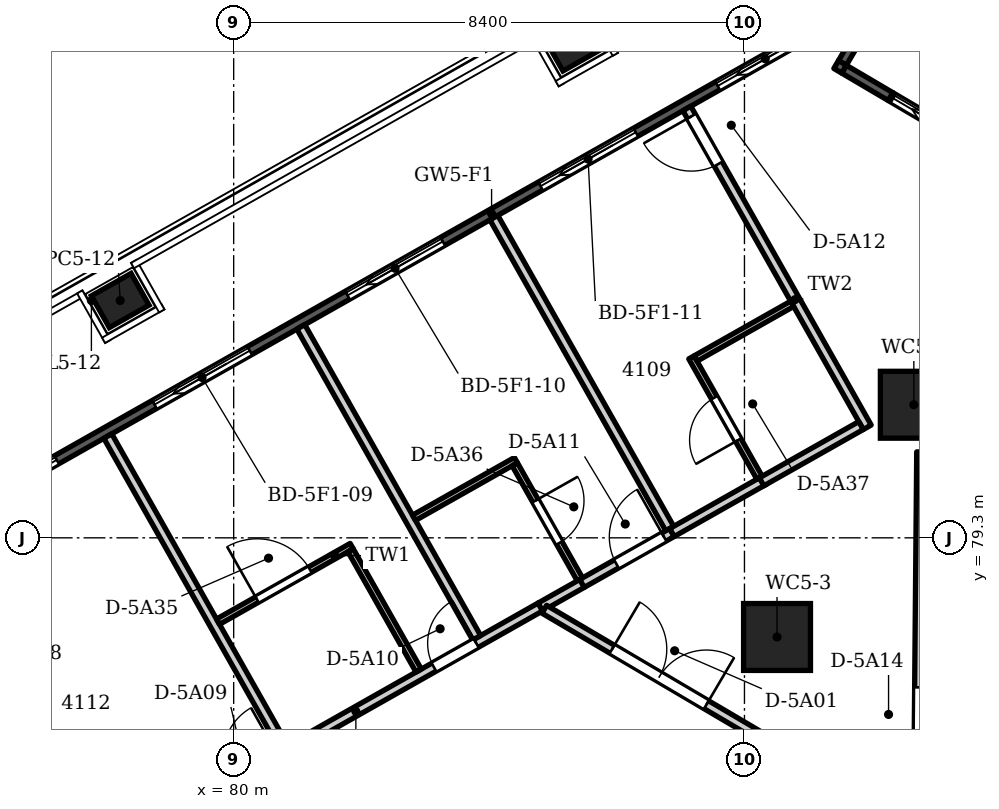
"""IFC4 building model, lengths in metres.
Left out: names, types, materials, properties, quantities, classifications, styles, units other than length and angle.
Written with IfcOpenShell. Run it as: python <this file> out.ifc"""

import sys

from ifc_helpers import new_model, si_unit, direction, frame, frame_2d, origin, origin_2d, place, context, subcontext, project, spatial, polyline, rectangle, circle, outline, extrude, element, fill, save


model = new_model("IFC4")
c1 = context("Model", 3, precision=1e-05, world=origin(), true_north=direction((0.0, 1.0)))
c2 = subcontext(c1, "Body", "Model", "MODEL_VIEW")
j1 = project(units=[si_unit("LENGTHUNIT", "METRE"), si_unit("PLANEANGLEUNIT", "RADIAN")], contexts=[c1])
p1 = place(None, origin())
s1 = spatial("IfcSite", under=j1, at=p1, CompositionType="ELEMENT")
p2 = place(p1, origin())
s2 = spatial("IfcBuilding", under=s1, at=p2, CompositionType="ELEMENT")
p3 = place(p2, frame((0.0, 0.0, 161.1)))
s3 = spatial("IfcBuildingStorey", under=s2, at=p3, CompositionType="ELEMENT", Elevation=161.1)
for number, where, z_axis, x_axis in (
    (1, (78.134, 83.203, -0.35), (0.0, 0.0, 1.0), (0.87, 0.492, 0.0)),
    (2, (85.594, 87.423, -0.35), (0.0, 0.0, 1.0), (0.87, 0.492, 0.0)),
):
    element("IfcColumn", number, at=place(p3, frame(where, z_axis=z_axis, x_axis=x_axis)), inside=s3, PredefinedType="COLUMN", context=c2, shape_type="SweptSolid", body=[
        extrude(rectangle(XDim=0.75, YDim=0.6, at=origin_2d()), origin(), (0.0, 0.0, 1.0), 3.95),
    ])
for number, where, z_axis, x_axis in (
    (3, (88.936, 77.669, -0.35), (0.0, 0.0, 1.0), (1.0, 0.0, 0.0)),
    (4, (91.185, 81.489, -0.35), (0.0, 0.0, 1.0), (1.0, 0.0, 0.0)),
):
    element("IfcColumn", number, at=place(p3, frame(where, z_axis=z_axis, x_axis=x_axis)), inside=s3, PredefinedType="COLUMN", context=c2, shape_type="SweptSolid", body=[
        extrude(circle(Radius=0.55, at=origin_2d()), origin(), (0.0, 0.0, 1.0), 3.95),
    ])
p4 = place(p3, frame((52.498, 66.67, 0.0), z_axis=(0.0, 0.0, 1.0), x_axis=(0.870354973249, 0.492424837453, 0.0)))
e5 = element("IfcWall", 5, at=p4, inside=s3, PredefinedType="SOLIDWALL", context=c2, shape_type="SweptSolid", body=[
    extrude(outline(polyline([(0.149, 0.075), (0.149, -0.075), (43.617, -0.075), (43.617, 0.075), (0.149, 0.075)])), origin(), (0.0, 0.0, 1.0), 3.3),
])
p5 = place(p4, frame((1.224, 0.0, 0.0)))
e6 = element("IfcOpeningElement", 6, at=p5, cuts=e5, PredefinedType="OPENING", context=c2, shape_type="SweptSolid", body=[
    extrude(rectangle(XDim=1.8, YDim=2.6, at=frame_2d((0.9, 1.3))), frame((0.0, 0.085, 0.0), z_axis=(0.0, -1.0, 0.0), x_axis=(1.0, 0.0, 0.0)), (0.0, 0.0, 1.0), 0.17),
])
p6 = place(p4, frame((4.571, 0.0, 0.0)))
e7 = element("IfcOpeningElement", 7, at=p6, cuts=e5, PredefinedType="OPENING", context=c2, shape_type="SweptSolid", body=[
    extrude(rectangle(XDim=1.8, YDim=2.6, at=frame_2d((0.9, 1.3))), frame((0.0, 0.085, 0.0), z_axis=(0.0, -1.0, 0.0), x_axis=(1.0, 0.0, 0.0)), (0.0, 0.0, 1.0), 0.17),
])
p7 = place(p4, frame((8.218, 0.0, 0.0)))
e8 = element("IfcOpeningElement", 8, at=p7, cuts=e5, PredefinedType="OPENING", context=c2, shape_type="SweptSolid", body=[
    extrude(rectangle(XDim=1.8, YDim=2.6, at=frame_2d((0.9, 1.3))), frame((0.0, 0.085, 0.0), z_axis=(0.0, -1.0, 0.0), x_axis=(1.0, 0.0, 0.0)), (0.0, 0.0, 1.0), 0.17),
])
p8 = place(p4, frame((11.865, 0.0, 0.0)))
e9 = element("IfcOpeningElement", 9, at=p8, cuts=e5, PredefinedType="OPENING", context=c2, shape_type="SweptSolid", body=[
    extrude(rectangle(XDim=1.8, YDim=2.6, at=frame_2d((0.9, 1.3))), frame((0.0, 0.085, 0.0), z_axis=(0.0, -1.0, 0.0), x_axis=(1.0, 0.0, 0.0)), (0.0, 0.0, 1.0), 0.17),
])
p9 = place(p4, frame((15.512, 0.0, 0.0)))
e10 = element("IfcOpeningElement", 10, at=p9, cuts=e5, PredefinedType="OPENING", context=c2, shape_type="SweptSolid", body=[
    extrude(rectangle(XDim=1.8, YDim=2.6, at=frame_2d((0.9, 1.3))), frame((0.0, 0.085, 0.0), z_axis=(0.0, -1.0, 0.0), x_axis=(1.0, 0.0, 0.0)), (0.0, 0.0, 1.0), 0.17),
])
p10 = place(p4, frame((19.16, 0.0, 0.0)))
e11 = element("IfcOpeningElement", 11, at=p10, cuts=e5, PredefinedType="OPENING", context=c2, shape_type="SweptSolid", body=[
    extrude(rectangle(XDim=1.8, YDim=2.6, at=frame_2d((0.9, 1.3))), frame((0.0, 0.085, 0.0), z_axis=(0.0, -1.0, 0.0), x_axis=(1.0, 0.0, 0.0)), (0.0, 0.0, 1.0), 0.17),
])
p11 = place(p4, frame((22.807, 0.0, 0.0)))
e12 = element("IfcOpeningElement", 12, at=p11, cuts=e5, PredefinedType="OPENING", context=c2, shape_type="SweptSolid", body=[
    extrude(rectangle(XDim=1.8, YDim=2.6, at=frame_2d((0.9, 1.3))), frame((0.0, 0.085, 0.0), z_axis=(0.0, -1.0, 0.0), x_axis=(1.0, 0.0, 0.0)), (0.0, 0.0, 1.0), 0.17),
])
p12 = place(p4, frame((26.454, 0.0, 0.0)))
e13 = element("IfcOpeningElement", 13, at=p12, cuts=e5, PredefinedType="OPENING", context=c2, shape_type="SweptSolid", body=[
    extrude(rectangle(XDim=1.8, YDim=2.6, at=frame_2d((0.9, 1.3))), frame((0.0, 0.085, 0.0), z_axis=(0.0, -1.0, 0.0), x_axis=(1.0, 0.0, 0.0)), (0.0, 0.0, 1.0), 0.17),
])
p13 = place(p4, frame((30.101, 0.0, 0.0)))
e14 = element("IfcOpeningElement", 14, at=p13, cuts=e5, PredefinedType="OPENING", context=c2, shape_type="SweptSolid", body=[
    extrude(rectangle(XDim=1.8, YDim=2.6, at=frame_2d((0.9, 1.3))), frame((0.0, 0.085, 0.0), z_axis=(0.0, -1.0, 0.0), x_axis=(1.0, 0.0, 0.0)), (0.0, 0.0, 1.0), 0.17),
])
p14 = place(p4, frame((33.748, 0.0, 0.0)))
e15 = element("IfcOpeningElement", 15, at=p14, cuts=e5, PredefinedType="OPENING", context=c2, shape_type="SweptSolid", body=[
    extrude(rectangle(XDim=1.8, YDim=2.6, at=frame_2d((0.9, 1.3))), frame((0.0, 0.085, 0.0), z_axis=(0.0, -1.0, 0.0), x_axis=(1.0, 0.0, 0.0)), (0.0, 0.0, 1.0), 0.17),
])
p15 = place(p4, frame((37.396, 0.0, 0.0)))
e16 = element("IfcOpeningElement", 16, at=p15, cuts=e5, PredefinedType="OPENING", context=c2, shape_type="SweptSolid", body=[
    extrude(rectangle(XDim=1.8, YDim=2.6, at=frame_2d((0.9, 1.3))), frame((0.0, 0.085, 0.0), z_axis=(0.0, -1.0, 0.0), x_axis=(1.0, 0.0, 0.0)), (0.0, 0.0, 1.0), 0.17),
])
p16 = place(p4, frame((40.743, 0.0, 0.0)))
e17 = element("IfcOpeningElement", 17, at=p16, cuts=e5, PredefinedType="OPENING", context=c2, shape_type="SweptSolid", body=[
    extrude(rectangle(XDim=1.8, YDim=2.6, at=frame_2d((0.9, 1.3))), frame((0.0, 0.085, 0.0), z_axis=(0.0, -1.0, 0.0), x_axis=(1.0, 0.0, 0.0)), (0.0, 0.0, 1.0), 0.17),
])
p17 = place(p3, frame((90.637, 88.174, 0.0), z_axis=(0.0, 0.0, 1.0), x_axis=(-0.507591242276, -0.861598009958, 0.0)))
e18 = element("IfcWall", 18, at=p17, inside=s3, PredefinedType="SOLIDWALL", context=c2, shape_type="SweptSolid", body=[
    extrude(outline(polyline([(0.149, 0.075), (0.149, -0.075), (1.235, -0.075), (1.235, 0.075), (0.149, 0.075)])), origin(), (0.0, 0.0, 1.0), 3.3),
])
p18 = place(p3, frame((89.942, 87.063, 0.0), z_axis=(0.0, 0.0, 1.0), x_axis=(0.861601384654, -0.50758551394, 0.0)))
e19 = element("IfcWall", 19, at=p18, inside=s3, PredefinedType="SOLIDWALL", context=c2, shape_type="SweptSolid", body=[
    extrude(outline(polyline([(0.11, -0.075), (1.0, -0.075), (1.0, 0.075), (0.11, 0.075), (0.11, -0.075)])), origin(), (0.0, 0.0, 1.0), 3.3),
])
p19 = place(p3, frame((90.804, 86.555, 0.0), z_axis=(0.0, 0.0, 1.0), x_axis=(0.861603693734, -0.50758159437, 0.0)))
e20 = element("IfcWall", 20, at=p19, inside=s3, PredefinedType="SOLIDWALL", context=c2, shape_type="SweptSolid", body=[
    extrude(outline(polyline([(0.0, -0.075), (1.9, -0.075), (1.9, 0.075), (0.0, 0.075), (0.0, -0.075)])), origin(), (0.0, 0.0, 1.0), 2.65),
])
p20 = place(p19, frame((0.05, 0.0, 0.0)))
e21 = element("IfcOpeningElement", 21, at=p20, cuts=e20, PredefinedType="OPENING", context=c2, shape_type="SweptSolid", body=[
    extrude(rectangle(XDim=1.8, YDim=2.6, at=frame_2d((0.9, 1.3))), frame((0.0, 0.085, 0.0), z_axis=(0.0, -1.0, 0.0), x_axis=(1.0, 0.0, 0.0)), (0.0, 0.0, 1.0), 0.17),
])
p21 = place(p3, frame((77.93, 80.973, 0.0), z_axis=(0.0, 0.0, 1.0), x_axis=(0.4923790567, -0.870380873252, 0.0)))
e22 = element("IfcWall", 22, at=p21, inside=s3, PredefinedType="PARTITIONING", context=c2, shape_type="SweptSolid", body=[
    extrude(rectangle(XDim=5.874, YDim=0.15, at=frame_2d((2.937, 0.0))), origin(), (0.0, 0.0, 1.0), 3.3),
])
p22 = place(p3, frame((79.742, 77.921, 0.0), z_axis=(0.0, 0.0, 1.0), x_axis=(0.870364731179, 0.49240759003, 0.0)))
e23 = element("IfcWall", 23, at=p22, inside=s3, PredefinedType="PARTITIONING", context=c2, shape_type="SweptSolid", body=[
    extrude(rectangle(XDim=2.526, YDim=0.1, at=frame_2d((1.263, 0.0))), origin(), (0.0, 0.0, 1.0), 3.3),
])
p23 = place(p22, frame((0.738, 0.0, 0.0)))
e24 = element("IfcOpeningElement", 24, at=p23, cuts=e23, PredefinedType="OPENING", context=c2, shape_type="SweptSolid", body=[
    extrude(rectangle(XDim=1.0, YDim=2.1, at=frame_2d((0.5, 1.05))), frame((0.0, 0.06, 0.0), z_axis=(0.0, -1.0, 0.0), x_axis=(1.0, 0.0, 0.0)), (0.0, 0.0, 1.0), 0.12),
])
p24 = place(p3, frame((80.856, 75.793, 0.0), z_axis=(0.0, 0.0, 1.0), x_axis=(0.870296246949, 0.492528621043, 0.0)))
e25 = element("IfcWall", 25, at=p24, inside=s3, PredefinedType="PARTITIONING", context=c2, shape_type="SweptSolid", body=[
    extrude(rectangle(XDim=4.812, YDim=0.15, at=frame_2d((2.406, 0.0))), origin(), (0.0, 0.0, 1.0), 3.3),
])
p25 = place(p24, frame((2.801, 0.0, 0.0)))
e26 = element("IfcOpeningElement", 26, at=p25, cuts=e25, PredefinedType="OPENING", context=c2, shape_type="SweptSolid", body=[
    extrude(rectangle(XDim=0.8, YDim=2.1, at=frame_2d((0.4, 1.05))), frame((0.0, 0.085, 0.0), z_axis=(0.0, -1.0, 0.0), x_axis=(1.0, 0.0, 0.0)), (0.0, 0.0, 1.0), 0.17),
])
p26 = place(p3, frame((81.104, 82.769, 0.0), z_axis=(0.0, 0.0, 1.0), x_axis=(0.492361245758, -0.870390948756, 0.0)))
e27 = element("IfcWall", 27, at=p26, inside=s3, PredefinedType="PARTITIONING", context=c2, shape_type="SweptSolid", body=[
    extrude(rectangle(XDim=5.875, YDim=0.15, at=frame_2d((2.937, 0.0))), origin(), (0.0, 0.0, 1.0), 3.3),
])
p27 = place(p3, frame((81.922, 79.096, 0.0), z_axis=(0.0, 0.0, 1.0), x_axis=(0.492424941649, -0.870354914298, 0.0)))
e28 = element("IfcWall", 28, at=p27, inside=s3, PredefinedType="PARTITIONING", context=c2, shape_type="SweptSolid", body=[
    extrude(rectangle(XDim=2.275, YDim=0.1, at=frame_2d((1.138, 0.0))), origin(), (0.0, 0.0, 1.0), 3.3),
])
p28 = place(p3, frame((82.966, 79.63, 0.0), z_axis=(0.0, 0.0, 1.0), x_axis=(0.870373787042, 0.492391582818, 0.0)))
e29 = element("IfcWall", 29, at=p28, inside=s3, PredefinedType="PARTITIONING", context=c2, shape_type="SweptSolid", body=[
    extrude(rectangle(XDim=1.925, YDim=0.1, at=frame_2d((0.962, 0.0))), origin(), (0.0, 0.0, 1.0), 3.3),
])
p29 = place(p3, frame((84.279, 84.565, 0.0), z_axis=(0.0, 0.0, 1.0), x_axis=(0.4923790567, -0.870380873252, 0.0)))
e30 = element("IfcWall", 30, at=p29, inside=s3, PredefinedType="PARTITIONING", context=c2, shape_type="SweptSolid", body=[
    extrude(rectangle(XDim=5.874, YDim=0.15, at=frame_2d((2.937, 0.0))), origin(), (0.0, 0.0, 1.0), 3.3),
])
p30 = place(p3, frame((84.623, 80.51, 0.0), z_axis=(0.0, 0.0, 1.0), x_axis=(0.492545299704, -0.870286807748, 0.0)))
e31 = element("IfcWall", 31, at=p30, inside=s3, PredefinedType="PARTITIONING", context=c2, shape_type="SweptSolid", body=[
    extrude(rectangle(XDim=2.176, YDim=0.1, at=frame_2d((1.088, 0.0))), origin(), (0.0, 0.0, 1.0), 3.3),
])
p31 = place(p30, frame((0.688, 0.0, 0.0)))
e32 = element("IfcOpeningElement", 32, at=p31, cuts=e31, PredefinedType="OPENING", context=c2, shape_type="SweptSolid", body=[
    extrude(rectangle(XDim=0.8, YDim=2.1, at=frame_2d((0.4, 1.05))), frame((0.0, 0.06, 0.0), z_axis=(0.0, -1.0, 0.0), x_axis=(1.0, 0.0, 0.0)), (0.0, 0.0, 1.0), 0.12),
])
p32 = place(p3, frame((85.044, 78.163, 0.0), z_axis=(0.0, 0.0, 1.0), x_axis=(0.870602999544, 0.491986196133, 0.0)))
e33 = element("IfcWall", 33, at=p32, inside=s3, PredefinedType="PARTITIONING", context=c2, shape_type="SweptSolid", body=[
    extrude(rectangle(XDim=0.792, YDim=0.15, at=frame_2d((0.396, 0.0))), origin(), (0.0, 0.0, 1.0), 3.3),
])
p33 = place(p3, frame((85.109, 78.125, 0.0), z_axis=(0.0, 0.0, 1.0), x_axis=(0.861598717736, -0.507590040875, 0.0)))
e34 = element("IfcWall", 34, at=p33, inside=s3, PredefinedType="PARTITIONING", context=c2, shape_type="SweptSolid", body=[
    extrude(rectangle(XDim=7.056, YDim=0.15, at=frame_2d((3.528, 0.0))), origin(), (0.0, 0.0, 1.0), 2.75),
])
p34 = place(p33, frame((1.293, 0.0, 0.0)))
e35 = element("IfcOpeningElement", 35, at=p34, cuts=e34, PredefinedType="OPENING", context=c2, shape_type="SweptSolid", body=[
    extrude(rectangle(XDim=1.8, YDim=2.1, at=frame_2d((0.9, 1.05))), frame((0.0, 0.085, 0.0), z_axis=(0.0, -1.0, 0.0), x_axis=(1.0, 0.0, 0.0)), (0.0, 0.0, 1.0), 0.17),
])
p35 = place(p3, frame((85.728, 78.55, 0.0), z_axis=(0.0, 0.0, 1.0), x_axis=(0.870461194111, 0.492237046093, 0.0)))
e36 = element("IfcWall", 36, at=p35, inside=s3, PredefinedType="PARTITIONING", context=c2, shape_type="SweptSolid", body=[
    extrude(rectangle(XDim=1.7, YDim=0.15, at=frame_2d((0.85, 0.0))), origin(), (0.0, 0.0, 1.0), 3.3),
])
p36 = place(p35, frame((0.65, 0.0, 0.0)))
e37 = element("IfcOpeningElement", 37, at=p36, cuts=e36, PredefinedType="OPENING", context=c2, shape_type="SweptSolid", body=[
    extrude(rectangle(XDim=0.9, YDim=2.1, at=frame_2d((0.45, 1.05))), frame((0.0, 0.085, 0.0), z_axis=(0.0, -1.0, 0.0), x_axis=(1.0, 0.0, 0.0)), (0.0, 0.0, 1.0), 0.17),
])
p37 = place(p3, frame((87.208, 79.387, 0.0), z_axis=(0.0, 0.0, 1.0), x_axis=(0.87020157879, 0.492695861837, 0.0)))
e38 = element("IfcWall", 38, at=p37, inside=s3, PredefinedType="PARTITIONING", context=c2, shape_type="SweptSolid", body=[
    extrude(rectangle(XDim=1.751, YDim=0.15, at=frame_2d((0.875, 0.0))), origin(), (0.0, 0.0, 1.0), 3.3),
])
p38 = place(p3, frame((87.453, 86.361, 0.0), z_axis=(0.0, 0.0, 1.0), x_axis=(0.492389730591, -0.870374834889, 0.0)))
e39 = element("IfcWall", 39, at=p38, inside=s3, PredefinedType="PARTITIONING", context=c2, shape_type="SweptSolid", body=[
    extrude(rectangle(XDim=6.024, YDim=0.15, at=frame_2d((3.012, 0.0))), origin(), (0.0, 0.0, 1.0), 3.3),
])
p39 = place(p38, frame((0.15, 0.0, 0.0)))
e40 = element("IfcOpeningElement", 40, at=p39, cuts=e39, PredefinedType="OPENING", context=c2, shape_type="SweptSolid", body=[
    extrude(rectangle(XDim=0.9, YDim=2.1, at=frame_2d((0.45, 1.05))), frame((0.0, 0.085, 0.0), z_axis=(0.0, -1.0, 0.0), x_axis=(1.0, 0.0, 0.0)), (0.0, 0.0, 1.0), 0.17),
])
p40 = place(p3, frame((87.527, 82.268, 0.0), z_axis=(0.0, 0.0, 1.0), x_axis=(0.492690247552, -0.870204757495, 0.0)))
e41 = element("IfcWall", 41, at=p40, inside=s3, PredefinedType="PARTITIONING", context=c2, shape_type="SweptSolid", body=[
    extrude(rectangle(XDim=2.274, YDim=0.1, at=frame_2d((1.137, 0.0))), origin(), (0.0, 0.0, 1.0), 3.3),
])
p41 = place(p40, frame((0.762, 0.0, 0.0)))
e42 = element("IfcOpeningElement", 42, at=p41, cuts=e41, PredefinedType="OPENING", context=c2, shape_type="SweptSolid", body=[
    extrude(rectangle(XDim=0.8, YDim=2.1, at=frame_2d((0.4, 1.05))), frame((0.0, 0.06, 0.0), z_axis=(0.0, -1.0, 0.0), x_axis=(1.0, 0.0, 0.0)), (0.0, 0.0, 1.0), 0.12),
])
p42 = place(p3, frame((87.595, 82.249, 0.0), z_axis=(0.0, 0.0, 1.0), x_axis=(0.870251448743, 0.492607770909, 0.0)))
e43 = element("IfcWall", 43, at=p42, inside=s3, PredefinedType="PARTITIONING", context=c2, shape_type="SweptSolid", body=[
    extrude(rectangle(XDim=1.826, YDim=0.1, at=frame_2d((0.913, 0.0))), origin(), (0.0, 0.0, 1.0), 3.3),
])
p43 = place(p3, frame((88.682, 80.221, 0.0), z_axis=(0.0, 0.0, 1.0), x_axis=(0.870323079534, 0.492481204951, 0.0)))
e44 = element("IfcWall", 44, at=p43, inside=s3, PredefinedType="PARTITIONING", context=c2, shape_type="SweptSolid", body=[
    extrude(rectangle(XDim=1.878, YDim=0.15, at=frame_2d((0.939, 0.0))), origin(), (0.0, 0.0, 1.0), 3.3),
])
p44 = place(p3, frame((91.253, 74.505, 0.0), z_axis=(0.0, 0.0, 1.0), x_axis=(0.008808844939, 0.999961201373, 0.0)))
e45 = element("IfcWall", 45, at=p44, inside=s3, PredefinedType="PARTITIONING", context=c2, shape_type="SweptSolid", body=[
    extrude(rectangle(XDim=6.208, YDim=0.15, at=frame_2d((3.104, 0.0))), origin(), (0.0, 0.0, 1.0), 3.3),
])
p45 = place(p44, frame((1.436, 0.0, 0.0)))
e46 = element("IfcOpeningElement", 46, at=p45, cuts=e45, PredefinedType="OPENING", context=c2, shape_type="SweptSolid", body=[
    extrude(rectangle(XDim=0.9, YDim=2.1, at=frame_2d((0.45, 1.05))), frame((0.0, 0.085, 0.0), z_axis=(0.0, -1.0, 0.0), x_axis=(1.0, 0.0, 0.0)), (0.0, 0.0, 1.0), 0.17),
])
p46 = place(p12, origin())
e47 = element("IfcDoor", 47, at=p46, inside=s3, OperationType="SLIDING_TO_LEFT", PredefinedType="DOOR", context=c2, shape_type="SweptSolid", body=[
    extrude(rectangle(XDim=1.8, YDim=2.6, at=frame_2d((0.9, 1.3))), frame((0.0, 0.025, 0.0), z_axis=(0.0, -1.0, 0.0), x_axis=(1.0, 0.0, 0.0)), (0.0, 0.0, 1.0), 0.05),
])
fill(e13, e47)
p47 = place(p13, origin())
e48 = element("IfcDoor", 48, at=p47, inside=s3, OperationType="SLIDING_TO_LEFT", PredefinedType="DOOR", context=c2, shape_type="SweptSolid", body=[
    extrude(rectangle(XDim=1.8, YDim=2.6, at=frame_2d((0.9, 1.3))), frame((0.0, 0.025, 0.0), z_axis=(0.0, -1.0, 0.0), x_axis=(1.0, 0.0, 0.0)), (0.0, 0.0, 1.0), 0.05),
])
fill(e14, e48)
p48 = place(p14, origin())
e49 = element("IfcDoor", 49, at=p48, inside=s3, OperationType="SLIDING_TO_LEFT", PredefinedType="DOOR", context=c2, shape_type="SweptSolid", body=[
    extrude(rectangle(XDim=1.8, YDim=2.6, at=frame_2d((0.9, 1.3))), frame((0.0, 0.025, 0.0), z_axis=(0.0, -1.0, 0.0), x_axis=(1.0, 0.0, 0.0)), (0.0, 0.0, 1.0), 0.05),
])
fill(e15, e49)
p49 = place(p15, origin())
e50 = element("IfcDoor", 50, at=p49, inside=s3, OperationType="SLIDING_TO_LEFT", PredefinedType="DOOR", context=c2, shape_type="SweptSolid", body=[
    extrude(rectangle(XDim=1.8, YDim=2.6, at=frame_2d((0.9, 1.3))), frame((0.0, 0.025, 0.0), z_axis=(0.0, -1.0, 0.0), x_axis=(1.0, 0.0, 0.0)), (0.0, 0.0, 1.0), 0.05),
])
fill(e16, e50)
p50 = place(p16, origin())
e51 = element("IfcDoor", 51, at=p50, inside=s3, OperationType="SLIDING_TO_LEFT", PredefinedType="DOOR", context=c2, shape_type="SweptSolid", body=[
    extrude(rectangle(XDim=1.8, YDim=2.6, at=frame_2d((0.9, 1.3))), frame((0.0, 0.025, 0.0), z_axis=(0.0, -1.0, 0.0), x_axis=(1.0, 0.0, 0.0)), (0.0, 0.0, 1.0), 0.05),
])
fill(e17, e51)
p51 = place(p20, origin())
e52 = element("IfcDoor", 52, at=p51, inside=s3, OperationType="SLIDING_TO_LEFT", PredefinedType="DOOR", context=c2, shape_type="SweptSolid", body=[
    extrude(rectangle(XDim=1.8, YDim=2.6, at=frame_2d((0.9, 1.3))), frame((0.0, 0.025, 0.0), z_axis=(0.0, -1.0, 0.0), x_axis=(1.0, 0.0, 0.0)), (0.0, 0.0, 1.0), 0.05),
])
fill(e21, e52)
p52 = place(p34, origin())
e53 = element("IfcDoor", 53, at=p52, inside=s3, OperationType="DOUBLE_DOOR_DOUBLE_SWING", PredefinedType="DOOR", context=c2, shape_type="SweptSolid", body=[
    extrude(rectangle(XDim=1.8, YDim=2.1, at=frame_2d((0.9, 1.05))), frame((0.0, 0.025, 0.0), z_axis=(0.0, -1.0, 0.0), x_axis=(1.0, 0.0, 0.0)), (0.0, 0.0, 1.0), 0.05),
])
fill(e35, e53)
p53 = place(p25, origin())
e54 = element("IfcDoor", 54, at=p53, inside=s3, OperationType="SINGLE_SWING_RIGHT", PredefinedType="DOOR", context=c2, shape_type="SweptSolid", body=[
    extrude(rectangle(XDim=0.8, YDim=2.1, at=frame_2d((0.4, 1.05))), frame((0.0, 0.025, 0.0), z_axis=(0.0, -1.0, 0.0), x_axis=(1.0, 0.0, 0.0)), (0.0, 0.0, 1.0), 0.05),
])
fill(e26, e54)
p54 = place(p36, origin())
e55 = element("IfcDoor", 55, at=p54, inside=s3, OperationType="SINGLE_SWING_RIGHT", PredefinedType="DOOR", context=c2, shape_type="SweptSolid", body=[
    extrude(rectangle(XDim=0.9, YDim=2.1, at=frame_2d((0.45, 1.05))), frame((0.0, 0.025, 0.0), z_axis=(0.0, -1.0, 0.0), x_axis=(1.0, 0.0, 0.0)), (0.0, 0.0, 1.0), 0.05),
])
fill(e37, e55)
p55 = place(p39, frame((0.9, 0.0, 0.0), z_axis=(0.0, 0.0, 1.0), x_axis=(-1.0, 0.0, 0.0)))
e56 = element("IfcDoor", 56, at=p55, inside=s3, OperationType="SINGLE_SWING_RIGHT", PredefinedType="DOOR", context=c2, shape_type="SweptSolid", body=[
    extrude(rectangle(XDim=0.9, YDim=2.1, at=frame_2d((0.45, 1.05))), frame((0.0, 0.025, 0.0), z_axis=(0.0, -1.0, 0.0), x_axis=(1.0, 0.0, 0.0)), (0.0, 0.0, 1.0), 0.05),
])
fill(e40, e56)
p56 = place(p45, frame((0.9, 0.0, 0.0), z_axis=(0.0, 0.0, 1.0), x_axis=(-1.0, 0.0, 0.0)))
e57 = element("IfcDoor", 57, at=p56, inside=s3, OperationType="SINGLE_SWING_RIGHT", PredefinedType="DOOR", context=c2, shape_type="SweptSolid", body=[
    extrude(rectangle(XDim=0.9, YDim=2.1, at=frame_2d((0.45, 1.05))), frame((0.0, 0.025, 0.0), z_axis=(0.0, -1.0, 0.0), x_axis=(1.0, 0.0, 0.0)), (0.0, 0.0, 1.0), 0.05),
])
fill(e46, e57)
p57 = place(p23, origin())
e58 = element("IfcDoor", 58, at=p57, inside=s3, OperationType="SINGLE_SWING_LEFT", PredefinedType="DOOR", context=c2, shape_type="SweptSolid", body=[
    extrude(rectangle(XDim=1.0, YDim=2.1, at=frame_2d((0.5, 1.05))), frame((0.0, 0.025, 0.0), z_axis=(0.0, -1.0, 0.0), x_axis=(1.0, 0.0, 0.0)), (0.0, 0.0, 1.0), 0.05),
])
fill(e24, e58)
p58 = place(p31, origin())
e59 = element("IfcDoor", 59, at=p58, inside=s3, OperationType="SINGLE_SWING_LEFT", PredefinedType="DOOR", context=c2, shape_type="SweptSolid", body=[
    extrude(rectangle(XDim=0.8, YDim=2.1, at=frame_2d((0.4, 1.05))), frame((0.0, 0.025, 0.0), z_axis=(0.0, -1.0, 0.0), x_axis=(1.0, 0.0, 0.0)), (0.0, 0.0, 1.0), 0.05),
])
fill(e32, e59)
p59 = place(p41, frame((0.8, 0.0, 0.0), z_axis=(0.0, 0.0, 1.0), x_axis=(-1.0, 0.0, 0.0)))
e60 = element("IfcDoor", 60, at=p59, inside=s3, OperationType="SINGLE_SWING_LEFT", PredefinedType="DOOR", context=c2, shape_type="SweptSolid", body=[
    extrude(rectangle(XDim=0.8, YDim=2.1, at=frame_2d((0.4, 1.05))), frame((0.0, 0.025, 0.0), z_axis=(0.0, -1.0, 0.0), x_axis=(1.0, 0.0, 0.0)), (0.0, 0.0, 1.0), 0.05),
])
fill(e42, e60)
save(model, sys.argv[1])
